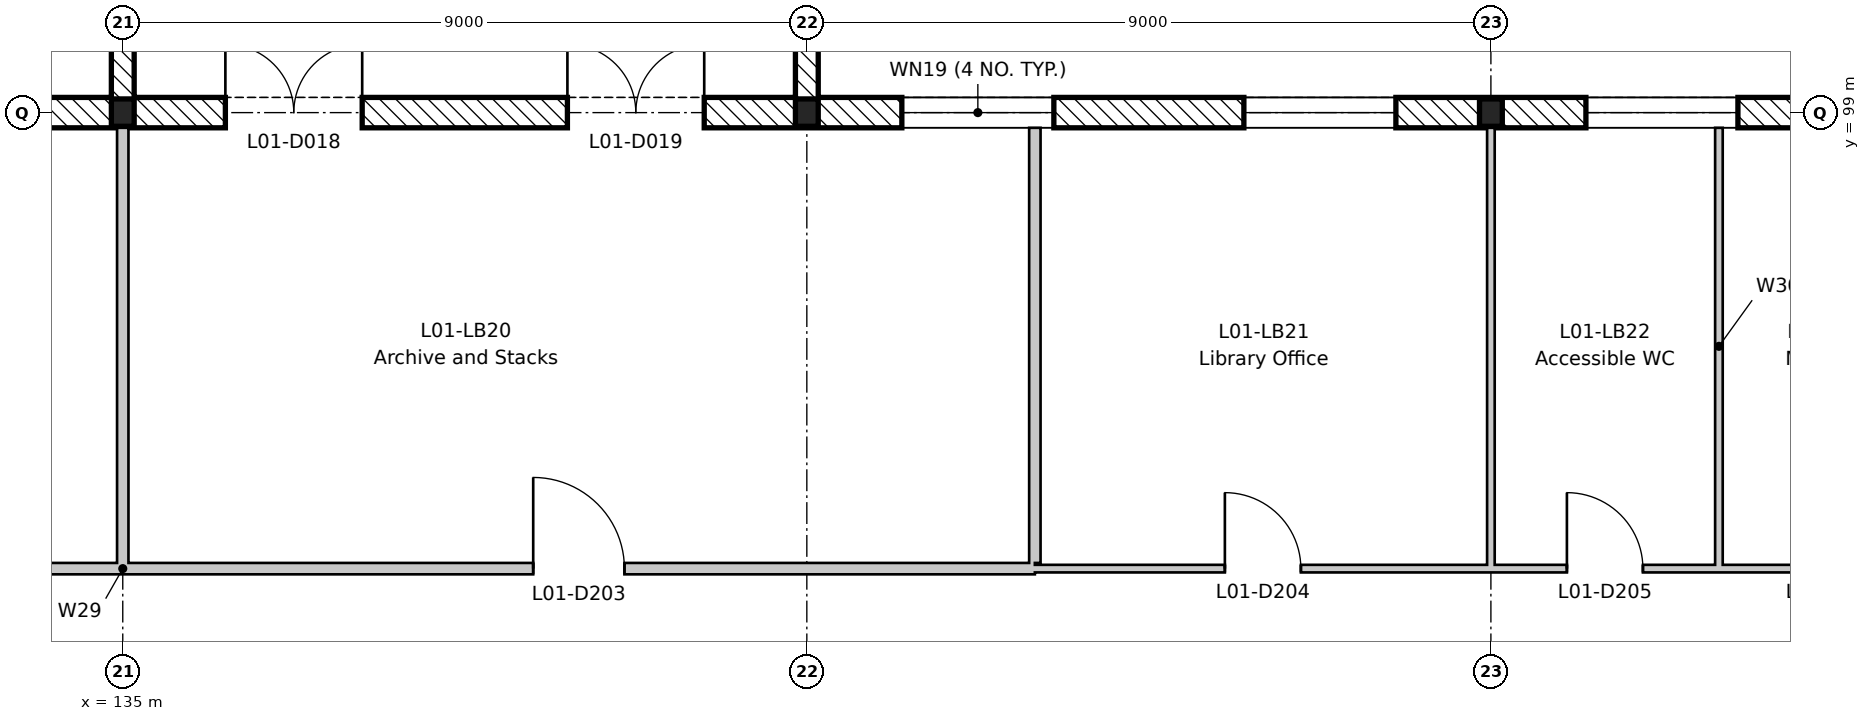
"""IFC4 building model, lengths in metres.
Left out: names, types, materials, properties, quantities, classifications, styles, units other than length and angle.
Written with IfcOpenShell. Run it as: python <this file> out.ifc"""

import sys

from ifc_helpers import new_model, si_unit, direction, frame, frame_2d, origin, origin_2d, place, context, subcontext, project, spatial, rectangle, i_section, extrude, element, fill, save


model = new_model("IFC4")
c1 = context("Model", 3, precision=1e-05, world=origin(), true_north=direction((0.0, 1.0)))
c2 = subcontext(c1, "Body", "Model", "MODEL_VIEW")
j1 = project(units=[si_unit("LENGTHUNIT", "METRE"), si_unit("PLANEANGLEUNIT", "RADIAN")], contexts=[c1])
p1 = place(None, origin())
s1 = spatial("IfcSite", under=j1, at=p1, CompositionType="ELEMENT")
p2 = place(p1, origin())
s2 = spatial("IfcBuilding", under=s1, at=p2, CompositionType="ELEMENT")
p3 = place(p2, frame((0.0, 0.0, 5.4)))
s3 = spatial("IfcBuildingStorey", under=s2, at=p3, CompositionType="ELEMENT", Elevation=5.4)
for number, where, z_axis, x_axis in (
    (1, (135.0, 99.0, -0.2), (0.0, 0.0, 1.0), (1.0, 0.0, 0.0)),
    (2, (144.0, 99.0, -0.2), (0.0, 0.0, 1.0), (1.0, 0.0, 0.0)),
    (3, (153.0, 99.0, -0.2), (0.0, 0.0, 1.0), (1.0, 0.0, 0.0)),
):
    element("IfcColumn", number, at=place(p3, frame(where, z_axis=z_axis, x_axis=x_axis)), inside=s3, PredefinedType="COLUMN", context=c2, shape_type="SweptSolid", body=[
        extrude(i_section(OverallWidth=0.3, OverallDepth=0.36, WebThickness=0.012, FlangeThickness=0.022, FilletRadius=0.027, at=origin_2d()), origin(), (0.0, 0.0, 1.0), 4.5),
    ])
for number, where, z_axis, x_axis in (
    (4, (135.0, 99.18, 0.0), (0.0, 0.0, 1.0), (0.0, 1.0, 0.0)),
    (5, (144.0, 99.18, 0.0), (0.0, 0.0, 1.0), (0.0, 1.0, 0.0)),
):
    element("IfcWall", number, at=place(p3, frame(where, z_axis=z_axis, x_axis=x_axis)), inside=s3, PredefinedType="STANDARD", context=c2, shape_type="SweptSolid", body=[
        extrude(rectangle(XDim=2.82, YDim=0.3, at=frame_2d((1.41, 0.0))), origin(), (0.0, 0.0, 1.0), 3.97),
    ])
p4 = place(p3, frame((116.8, 99.0, 0.0), z_axis=(0.0, 0.0, 1.0), x_axis=(1.0, 0.0, 0.0)))
e6 = element("IfcWall", 6, at=p4, inside=s3, PredefinedType="STANDARD", context=c2, shape_type="SweptSolid", body=[
    extrude(rectangle(XDim=54.4, YDim=0.4, at=frame_2d((27.2, 0.0))), origin(), (0.0, 0.0, 1.0), 4.3),
])
p5 = place(p4, frame((1.45, 0.0, 0.5)))
e7 = element("IfcOpeningElement", 7, at=p5, cuts=e6, PredefinedType="OPENING", context=c2, shape_type="SweptSolid", body=[
    extrude(rectangle(XDim=2.0, YDim=3.2, at=frame_2d((1.0, 1.6))), frame((0.0, 0.21, 0.0), z_axis=(0.0, -1.0, 0.0), x_axis=(1.0, 0.0, 0.0)), (0.0, 0.0, 1.0), 0.42),
])
p6 = place(p4, frame((5.95, 0.0, 0.5)))
e8 = element("IfcOpeningElement", 8, at=p6, cuts=e6, PredefinedType="OPENING", context=c2, shape_type="SweptSolid", body=[
    extrude(rectangle(XDim=2.0, YDim=3.2, at=frame_2d((1.0, 1.6))), frame((0.0, 0.21, 0.0), z_axis=(0.0, -1.0, 0.0), x_axis=(1.0, 0.0, 0.0)), (0.0, 0.0, 1.0), 0.42),
])
p7 = place(p4, frame((10.45, 0.0, 0.5)))
e9 = element("IfcOpeningElement", 9, at=p7, cuts=e6, PredefinedType="OPENING", context=c2, shape_type="SweptSolid", body=[
    extrude(rectangle(XDim=2.0, YDim=3.2, at=frame_2d((1.0, 1.6))), frame((0.0, 0.21, 0.0), z_axis=(0.0, -1.0, 0.0), x_axis=(1.0, 0.0, 0.0)), (0.0, 0.0, 1.0), 0.42),
])
p8 = place(p4, frame((14.95, 0.0, 0.5)))
e10 = element("IfcOpeningElement", 10, at=p8, cuts=e6, PredefinedType="OPENING", context=c2, shape_type="SweptSolid", body=[
    extrude(rectangle(XDim=2.0, YDim=3.2, at=frame_2d((1.0, 1.6))), frame((0.0, 0.21, 0.0), z_axis=(0.0, -1.0, 0.0), x_axis=(1.0, 0.0, 0.0)), (0.0, 0.0, 1.0), 0.42),
])
p9 = place(p4, frame((28.45, 0.0, 0.5)))
e11 = element("IfcOpeningElement", 11, at=p9, cuts=e6, PredefinedType="OPENING", context=c2, shape_type="SweptSolid", body=[
    extrude(rectangle(XDim=2.0, YDim=3.2, at=frame_2d((1.0, 1.6))), frame((0.0, 0.21, 0.0), z_axis=(0.0, -1.0, 0.0), x_axis=(1.0, 0.0, 0.0)), (0.0, 0.0, 1.0), 0.42),
])
p10 = place(p4, frame((32.95, 0.0, 0.5)))
e12 = element("IfcOpeningElement", 12, at=p10, cuts=e6, PredefinedType="OPENING", context=c2, shape_type="SweptSolid", body=[
    extrude(rectangle(XDim=2.0, YDim=3.2, at=frame_2d((1.0, 1.6))), frame((0.0, 0.21, 0.0), z_axis=(0.0, -1.0, 0.0), x_axis=(1.0, 0.0, 0.0)), (0.0, 0.0, 1.0), 0.42),
])
p11 = place(p4, frame((37.45, 0.0, 0.5)))
e13 = element("IfcOpeningElement", 13, at=p11, cuts=e6, PredefinedType="OPENING", context=c2, shape_type="SweptSolid", body=[
    extrude(rectangle(XDim=2.0, YDim=3.2, at=frame_2d((1.0, 1.6))), frame((0.0, 0.21, 0.0), z_axis=(0.0, -1.0, 0.0), x_axis=(1.0, 0.0, 0.0)), (0.0, 0.0, 1.0), 0.42),
])
p12 = place(p4, frame((41.95, 0.0, 0.5)))
e14 = element("IfcOpeningElement", 14, at=p12, cuts=e6, PredefinedType="OPENING", context=c2, shape_type="SweptSolid", body=[
    extrude(rectangle(XDim=2.0, YDim=3.2, at=frame_2d((1.0, 1.6))), frame((0.0, 0.21, 0.0), z_axis=(0.0, -1.0, 0.0), x_axis=(1.0, 0.0, 0.0)), (0.0, 0.0, 1.0), 0.42),
])
p13 = place(p4, frame((19.55, 0.0, 0.0)))
e15 = element("IfcOpeningElement", 15, at=p13, cuts=e6, PredefinedType="OPENING", context=c2, shape_type="SweptSolid", body=[
    extrude(rectangle(XDim=1.8, YDim=2.4, at=frame_2d((0.9, 1.2))), frame((0.0, 0.21, 0.0), z_axis=(0.0, -1.0, 0.0), x_axis=(1.0, 0.0, 0.0)), (0.0, 0.0, 1.0), 0.42),
])
p14 = place(p4, frame((24.05, 0.0, 0.0)))
e16 = element("IfcOpeningElement", 16, at=p14, cuts=e6, PredefinedType="OPENING", context=c2, shape_type="SweptSolid", body=[
    extrude(rectangle(XDim=1.8, YDim=2.4, at=frame_2d((0.9, 1.2))), frame((0.0, 0.21, 0.0), z_axis=(0.0, -1.0, 0.0), x_axis=(1.0, 0.0, 0.0)), (0.0, 0.0, 1.0), 0.42),
])
p15 = place(p3, frame((120.3, 93.0, 0.0), z_axis=(0.0, 0.0, 1.0), x_axis=(1.0, 0.0, 0.0)))
e17 = element("IfcWall", 17, at=p15, inside=s3, PredefinedType="PARTITIONING", context=c2, shape_type="SweptSolid", body=[
    extrude(rectangle(XDim=26.7, YDim=0.15, at=frame_2d((13.35, 0.0))), origin(), (0.0, 0.0, 1.0), 3.78),
])
p16 = place(p15, frame((8.1, 0.0, 0.0)))
e18 = element("IfcOpeningElement", 18, at=p16, cuts=e17, PredefinedType="OPENING", context=c2, shape_type="SweptSolid", body=[
    extrude(rectangle(XDim=1.2, YDim=2.1, at=frame_2d((0.6, 1.05))), frame((0.0, 0.085, 0.0), z_axis=(0.0, -1.0, 0.0), x_axis=(1.0, 0.0, 0.0)), (0.0, 0.0, 1.0), 0.17),
])
p17 = place(p15, frame((20.1, 0.0, 0.0)))
e19 = element("IfcOpeningElement", 19, at=p17, cuts=e17, PredefinedType="OPENING", context=c2, shape_type="SweptSolid", body=[
    extrude(rectangle(XDim=1.2, YDim=2.1, at=frame_2d((0.6, 1.05))), frame((0.0, 0.085, 0.0), z_axis=(0.0, -1.0, 0.0), x_axis=(1.0, 0.0, 0.0)), (0.0, 0.0, 1.0), 0.17),
])
p18 = place(p3, frame((147.0, 93.0, 0.0), z_axis=(0.0, 0.0, 1.0), x_axis=(1.0, 0.0, 0.0)))
e20 = element("IfcWall", 20, at=p18, inside=s3, PredefinedType="PARTITIONING", context=c2, shape_type="SweptSolid", body=[
    extrude(rectangle(XDim=14.875, YDim=0.1, at=frame_2d((7.438, 0.0))), origin(), (0.0, 0.0, 1.0), 3.78),
])
p19 = place(p18, frame((2.5, 0.0, 0.0)))
e21 = element("IfcOpeningElement", 21, at=p19, cuts=e20, PredefinedType="OPENING", context=c2, shape_type="SweptSolid", body=[
    extrude(rectangle(XDim=1.0, YDim=2.1, at=frame_2d((0.5, 1.05))), frame((0.0, 0.06, 0.0), z_axis=(0.0, -1.0, 0.0), x_axis=(1.0, 0.0, 0.0)), (0.0, 0.0, 1.0), 0.12),
])
p20 = place(p18, frame((7.0, 0.0, 0.0)))
e22 = element("IfcOpeningElement", 22, at=p20, cuts=e20, PredefinedType="OPENING", context=c2, shape_type="SweptSolid", body=[
    extrude(rectangle(XDim=1.0, YDim=2.1, at=frame_2d((0.5, 1.05))), frame((0.0, 0.06, 0.0), z_axis=(0.0, -1.0, 0.0), x_axis=(1.0, 0.0, 0.0)), (0.0, 0.0, 1.0), 0.12),
])
p21 = place(p18, frame((10.05, 0.0, 0.0)))
e23 = element("IfcOpeningElement", 23, at=p21, cuts=e20, PredefinedType="OPENING", context=c2, shape_type="SweptSolid", body=[
    extrude(rectangle(XDim=0.9, YDim=2.1, at=frame_2d((0.45, 1.05))), frame((0.0, 0.06, 0.0), z_axis=(0.0, -1.0, 0.0), x_axis=(1.0, 0.0, 0.0)), (0.0, 0.0, 1.0), 0.12),
])
p22 = place(p18, frame((13.05, 0.0, 0.0)))
e24 = element("IfcOpeningElement", 24, at=p22, cuts=e20, PredefinedType="OPENING", context=c2, shape_type="SweptSolid", body=[
    extrude(rectangle(XDim=0.9, YDim=2.1, at=frame_2d((0.45, 1.05))), frame((0.0, 0.06, 0.0), z_axis=(0.0, -1.0, 0.0), x_axis=(1.0, 0.0, 0.0)), (0.0, 0.0, 1.0), 0.12),
])
for number, where, z_axis, x_axis in (
    (25, (135.0, 93.075, 0.0), (0.0, 0.0, 1.0), (0.0, 1.0, 0.0)),
    (26, (147.0, 93.075, 0.0), (0.0, 0.0, 1.0), (0.0, 1.0, 0.0)),
):
    element("IfcWall", number, at=place(p3, frame(where, z_axis=z_axis, x_axis=x_axis)), inside=s3, PredefinedType="PARTITIONING", context=c2, shape_type="SweptSolid", body=[
        extrude(rectangle(XDim=5.725, YDim=0.15, at=frame_2d((2.863, 0.0))), origin(), (0.0, 0.0, 1.0), 3.78),
    ])
for number, where, z_axis, x_axis in (
    (27, (153.0, 93.05, 0.0), (0.0, 0.0, 1.0), (0.0, 1.0, 0.0)),
    (28, (156.0, 93.05, 0.0), (0.0, 0.0, 1.0), (0.0, 1.0, 0.0)),
):
    element("IfcWall", number, at=place(p3, frame(where, z_axis=z_axis, x_axis=x_axis)), inside=s3, PredefinedType="PARTITIONING", context=c2, shape_type="SweptSolid", body=[
        extrude(rectangle(XDim=5.75, YDim=0.1, at=frame_2d((2.875, 0.0))), origin(), (0.0, 0.0, 1.0), 3.78),
    ])
p23 = place(p9, origin())
e29 = element("IfcWindow", 29, at=p23, inside=s3, PartitioningType="SINGLE_PANEL", PredefinedType="WINDOW", context=c2, shape_type="SweptSolid", body=[
    extrude(rectangle(XDim=2.0, YDim=3.2, at=frame_2d((1.0, 1.6))), frame((0.0, 0.03, 0.0), z_axis=(0.0, -1.0, 0.0), x_axis=(1.0, 0.0, 0.0)), (0.0, 0.0, 1.0), 0.06),
])
fill(e11, e29)
p24 = place(p10, origin())
e30 = element("IfcWindow", 30, at=p24, inside=s3, PartitioningType="SINGLE_PANEL", PredefinedType="WINDOW", context=c2, shape_type="SweptSolid", body=[
    extrude(rectangle(XDim=2.0, YDim=3.2, at=frame_2d((1.0, 1.6))), frame((0.0, 0.03, 0.0), z_axis=(0.0, -1.0, 0.0), x_axis=(1.0, 0.0, 0.0)), (0.0, 0.0, 1.0), 0.06),
])
fill(e12, e30)
p25 = place(p11, origin())
e31 = element("IfcWindow", 31, at=p25, inside=s3, PartitioningType="SINGLE_PANEL", PredefinedType="WINDOW", context=c2, shape_type="SweptSolid", body=[
    extrude(rectangle(XDim=2.0, YDim=3.2, at=frame_2d((1.0, 1.6))), frame((0.0, 0.03, 0.0), z_axis=(0.0, -1.0, 0.0), x_axis=(1.0, 0.0, 0.0)), (0.0, 0.0, 1.0), 0.06),
])
fill(e13, e31)
p26 = place(p13, origin())
e32 = element("IfcDoor", 32, at=p26, inside=s3, OperationType="DOUBLE_DOOR_SINGLE_SWING", PredefinedType="DOOR", context=c2, shape_type="SweptSolid", body=[
    extrude(rectangle(XDim=1.8, YDim=2.4, at=frame_2d((0.9, 1.2))), frame((0.0, 0.025, 0.0), z_axis=(0.0, -1.0, 0.0), x_axis=(1.0, 0.0, 0.0)), (0.0, 0.0, 1.0), 0.05),
])
fill(e15, e32)
p27 = place(p14, origin())
e33 = element("IfcDoor", 33, at=p27, inside=s3, OperationType="DOUBLE_DOOR_SINGLE_SWING", PredefinedType="DOOR", context=c2, shape_type="SweptSolid", body=[
    extrude(rectangle(XDim=1.8, YDim=2.4, at=frame_2d((0.9, 1.2))), frame((0.0, 0.025, 0.0), z_axis=(0.0, -1.0, 0.0), x_axis=(1.0, 0.0, 0.0)), (0.0, 0.0, 1.0), 0.05),
])
fill(e16, e33)
p28 = place(p17, origin())
e34 = element("IfcDoor", 34, at=p28, inside=s3, OperationType="SINGLE_SWING_LEFT", PredefinedType="DOOR", context=c2, shape_type="SweptSolid", body=[
    extrude(rectangle(XDim=1.2, YDim=2.1, at=frame_2d((0.6, 1.05))), frame((0.0, 0.025, 0.0), z_axis=(0.0, -1.0, 0.0), x_axis=(1.0, 0.0, 0.0)), (0.0, 0.0, 1.0), 0.05),
])
fill(e19, e34)
p29 = place(p19, origin())
e35 = element("IfcDoor", 35, at=p29, inside=s3, OperationType="SINGLE_SWING_LEFT", PredefinedType="DOOR", context=c2, shape_type="SweptSolid", body=[
    extrude(rectangle(XDim=1.0, YDim=2.1, at=frame_2d((0.5, 1.05))), frame((0.0, 0.025, 0.0), z_axis=(0.0, -1.0, 0.0), x_axis=(1.0, 0.0, 0.0)), (0.0, 0.0, 1.0), 0.05),
])
fill(e21, e35)
p30 = place(p20, origin())
e36 = element("IfcDoor", 36, at=p30, inside=s3, OperationType="SINGLE_SWING_LEFT", PredefinedType="DOOR", context=c2, shape_type="SweptSolid", body=[
    extrude(rectangle(XDim=1.0, YDim=2.1, at=frame_2d((0.5, 1.05))), frame((0.0, 0.025, 0.0), z_axis=(0.0, -1.0, 0.0), x_axis=(1.0, 0.0, 0.0)), (0.0, 0.0, 1.0), 0.05),
])
fill(e22, e36)
save(model, sys.argv[1])
